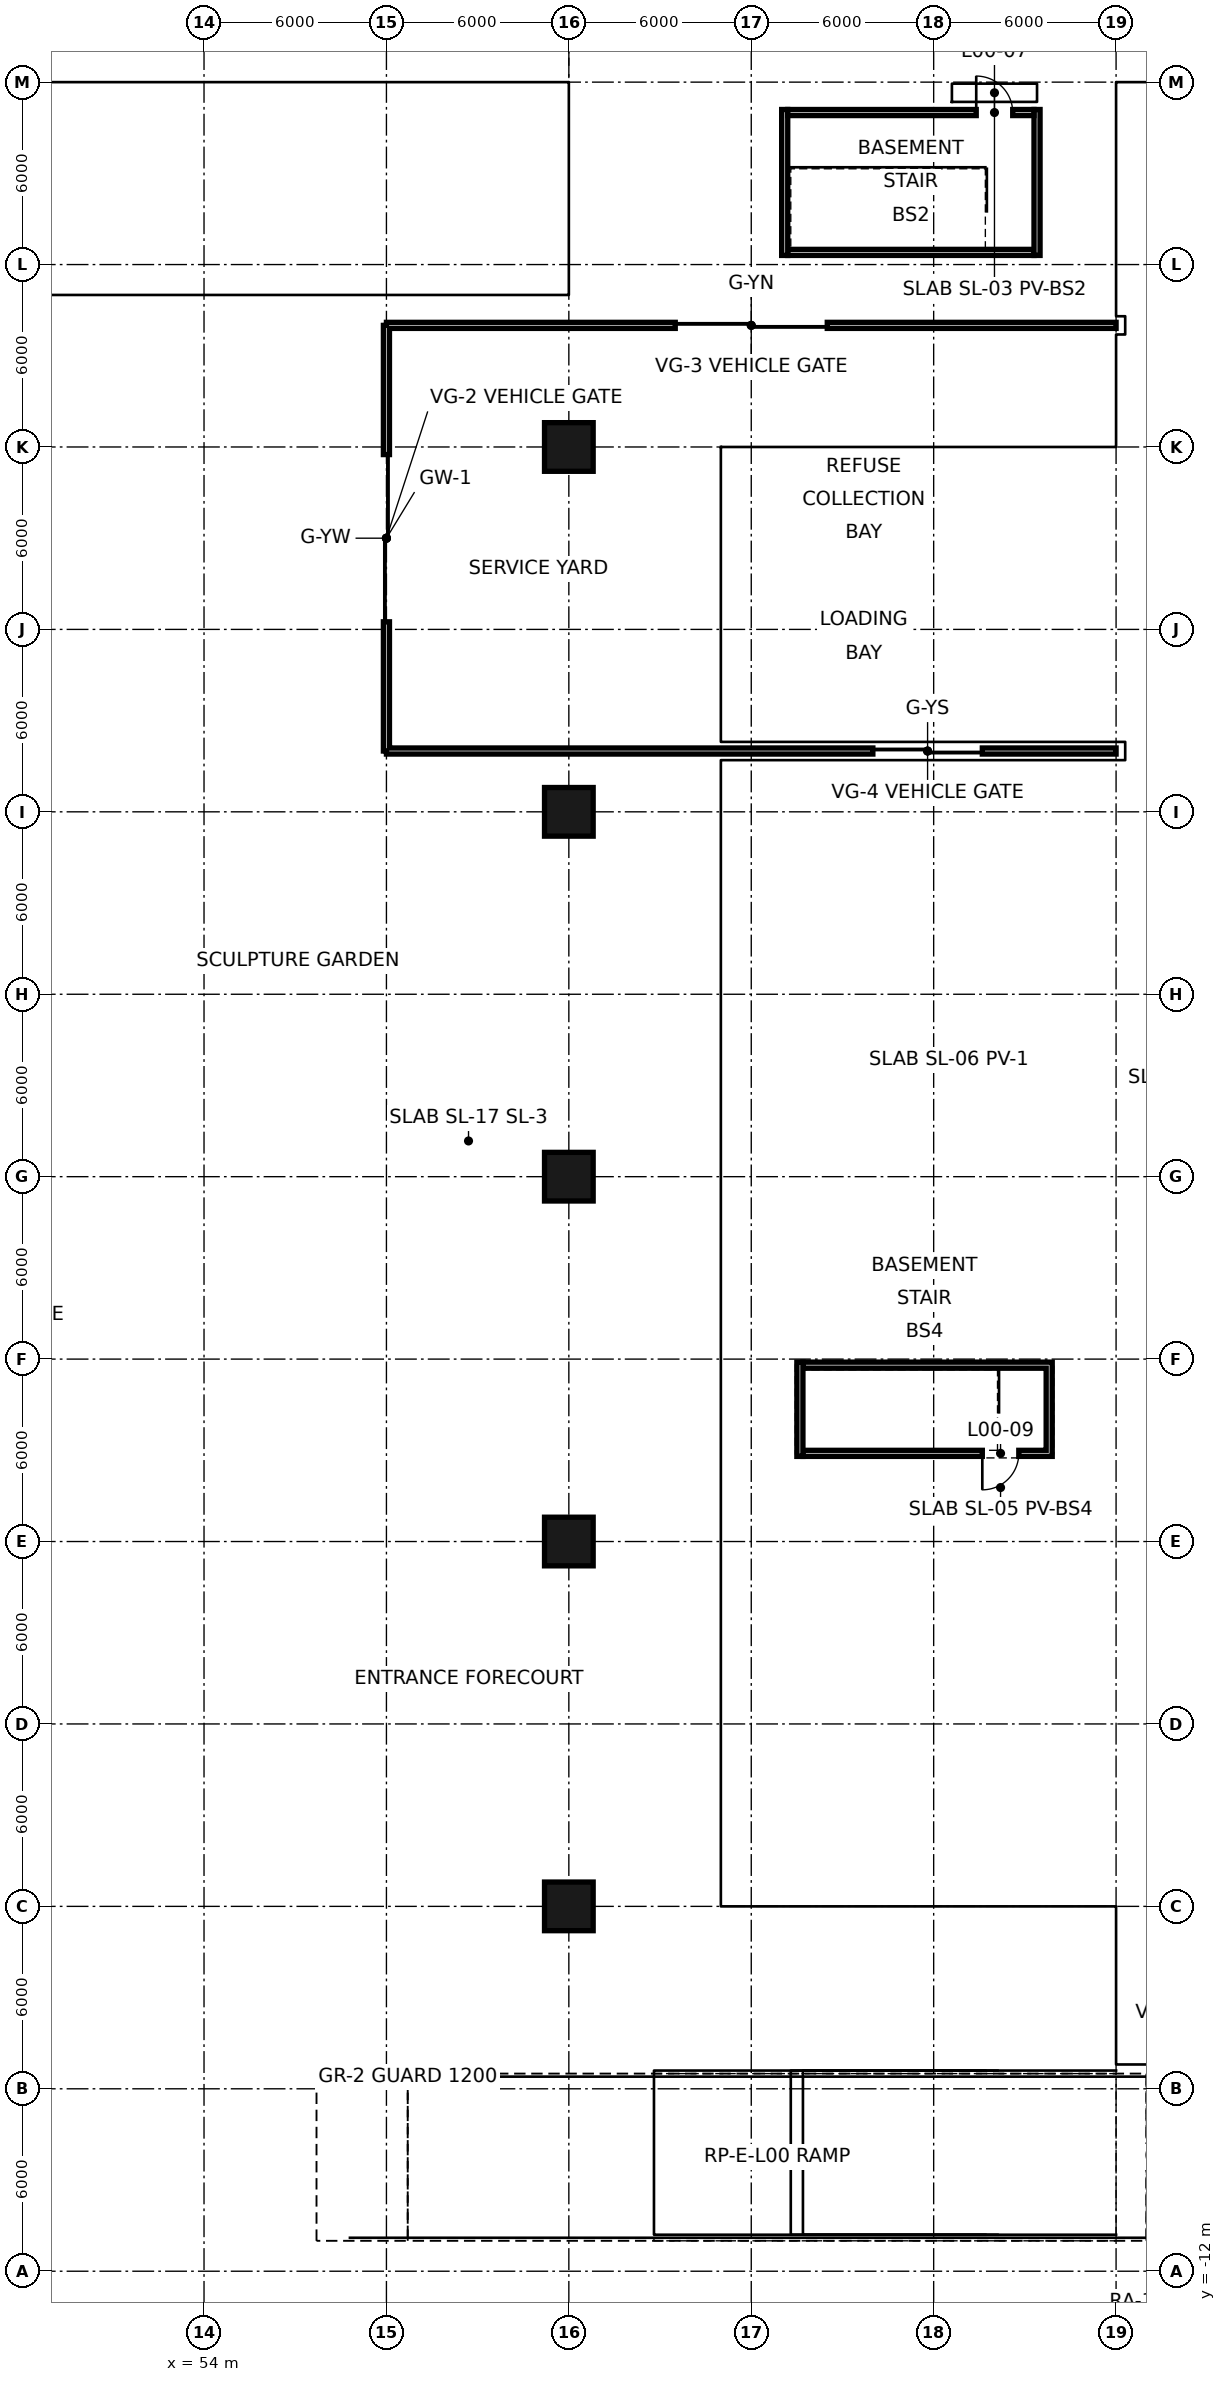
"""IFC4 building model, lengths in metres.
Left out: names, types, materials, properties, quantities, classifications, styles, units other than length and angle.
Written with IfcOpenShell. Run it as: python <this file> out.ifc"""

import sys

from ifc_helpers import new_model, si_unit, direction, frame, frame_2d, origin, origin_2d, place, context, subcontext, project, spatial, rectangle, hollow_rectangle, extrude, element, fill, save


model = new_model("IFC4")
c1 = context("Model", 3, precision=1e-05, world=origin(), true_north=direction((0.0, 1.0)))
c2 = subcontext(c1, "Body", "Model", "MODEL_VIEW")
j1 = project(units=[si_unit("LENGTHUNIT", "METRE"), si_unit("PLANEANGLEUNIT", "RADIAN")], contexts=[c1])
p1 = place(None, origin())
s1 = spatial("IfcSite", under=j1, at=p1, CompositionType="ELEMENT")
p2 = place(p1, origin())
s2 = spatial("IfcBuilding", under=s1, at=p2, CompositionType="ELEMENT")
p3 = place(p2, origin())
s3 = spatial("IfcBuildingStorey", under=s2, at=p3, CompositionType="ELEMENT", Elevation=0.0)
for number, where, z_axis, x_axis in (
    (1, (66.0, 0.0, 0.0), (0.0, 0.0, 1.0), (1.0, 0.0, 0.0)),
    (2, (66.0, 12.0, 0.0), (0.0, 0.0, 1.0), (1.0, 0.0, 0.0)),
    (3, (66.0, 24.0, 0.0), (0.0, 0.0, 1.0), (1.0, 0.0, 0.0)),
    (4, (66.0, 36.0, 0.0), (0.0, 0.0, 1.0), (1.0, 0.0, 0.0)),
    (5, (66.0, 48.0, 0.0), (0.0, 0.0, 1.0), (1.0, 0.0, 0.0)),
):
    element("IfcColumn", number, at=place(p3, frame(where, z_axis=z_axis, x_axis=x_axis)), inside=s3, PredefinedType="COLUMN", context=c2, shape_type="SweptSolid", body=[
        extrude(hollow_rectangle(XDim=1.6, YDim=1.6, WallThickness=0.07, at=origin_2d()), origin(), (0.0, 0.0, 1.0), 15.0),
    ])
p4 = place(p3, frame((73.1, 54.3, 0.0), z_axis=(0.0, 0.0, 1.0), x_axis=(0.0, 1.0, 0.0)))
e6 = element("IfcWall", 6, at=p4, inside=s3, PredefinedType="SOLIDWALL", context=c2, shape_type="SweptSolid", body=[
    extrude(rectangle(XDim=4.8, YDim=0.2, at=frame_2d((2.4, 0.0))), origin(), (0.0, 0.0, 1.0), 14.55),
])
p5 = place(p3, frame((73.6, 14.8, 0.0), z_axis=(0.0, 0.0, 1.0), x_axis=(0.0, 1.0, 0.0)))
e7 = element("IfcWall", 7, at=p5, inside=s3, PredefinedType="SOLIDWALL", context=c2, shape_type="SweptSolid", body=[
    extrude(rectangle(XDim=3.1, YDim=0.2, at=frame_2d((1.55, 0.0))), origin(), (0.0, 0.0, 1.0), 14.55),
])
p6 = place(p3, frame((81.4, 54.3, 0.0), z_axis=(0.0, 0.0, 1.0), x_axis=(0.0, 1.0, 0.0)))
e8 = element("IfcWall", 8, at=p6, inside=s3, PredefinedType="SOLIDWALL", context=c2, shape_type="SweptSolid", body=[
    extrude(rectangle(XDim=4.8, YDim=0.2, at=frame_2d((2.4, 0.0))), origin(), (0.0, 0.0, 1.0), 14.55),
])
p7 = place(p3, frame((81.8, 14.8, 0.0), z_axis=(0.0, 0.0, 1.0), x_axis=(0.0, 1.0, 0.0)))
e9 = element("IfcWall", 9, at=p7, inside=s3, PredefinedType="SOLIDWALL", context=c2, shape_type="SweptSolid", body=[
    extrude(rectangle(XDim=3.1, YDim=0.2, at=frame_2d((1.55, 0.0))), origin(), (0.0, 0.0, 1.0), 14.55),
])
p8 = place(p3, frame((73.7, 14.9, 0.0), z_axis=(0.0, 0.0, 1.0), x_axis=(1.0, 0.0, 0.0)))
e10 = element("IfcWall", 10, at=p8, inside=s3, PredefinedType="SOLIDWALL", context=c2, shape_type="SweptSolid", body=[
    extrude(rectangle(XDim=8.0, YDim=0.2, at=frame_2d((4.0, 0.0))), origin(), (0.0, 0.0, 1.0), 14.55),
])
p9 = place(p8, frame((5.9, 0.0, 0.0)))
e11 = element("IfcOpeningElement", 11, at=p9, cuts=e10, PredefinedType="OPENING", context=c2, shape_type="SweptSolid", body=[
    extrude(rectangle(XDim=1.2, YDim=2.4, at=frame_2d((0.6, 1.2))), frame((0.0, 0.11, 0.0), z_axis=(0.0, -1.0, 0.0), x_axis=(1.0, 0.0, 0.0)), (0.0, 0.0, 1.0), 0.22),
])
p10 = place(p3, frame((73.7, 17.8, 0.0), z_axis=(0.0, 0.0, 1.0), x_axis=(1.0, 0.0, 0.0)))
e12 = element("IfcWall", 12, at=p10, inside=s3, PredefinedType="SOLIDWALL", context=c2, shape_type="SweptSolid", body=[
    extrude(rectangle(XDim=8.0, YDim=0.2, at=frame_2d((4.0, 0.0))), origin(), (0.0, 0.0, 1.0), 14.55),
])
p11 = place(p3, frame((73.2, 54.4, 0.0), z_axis=(0.0, 0.0, 1.0), x_axis=(1.0, 0.0, 0.0)))
e13 = element("IfcWall", 13, at=p11, inside=s3, PredefinedType="SOLIDWALL", context=c2, shape_type="SweptSolid", body=[
    extrude(rectangle(XDim=8.1, YDim=0.2, at=frame_2d((4.05, 0.0))), origin(), (0.0, 0.0, 1.0), 14.55),
])
p12 = place(p3, frame((73.2, 59.0, 0.0), z_axis=(0.0, 0.0, 1.0), x_axis=(1.0, 0.0, 0.0)))
e14 = element("IfcWall", 14, at=p12, inside=s3, PredefinedType="SOLIDWALL", context=c2, shape_type="SweptSolid", body=[
    extrude(rectangle(XDim=8.1, YDim=0.2, at=frame_2d((4.05, 0.0))), origin(), (0.0, 0.0, 1.0), 14.55),
])
p13 = place(p12, frame((6.2, 0.0, 0.0)))
e15 = element("IfcOpeningElement", 15, at=p13, cuts=e14, PredefinedType="OPENING", context=c2, shape_type="SweptSolid", body=[
    extrude(rectangle(XDim=1.2, YDim=2.4, at=frame_2d((0.6, 1.2))), frame((0.0, 0.11, 0.0), z_axis=(0.0, -1.0, 0.0), x_axis=(1.0, 0.0, 0.0)), (0.0, 0.0, 1.0), 0.22),
])
p14 = place(p3, frame((60.0, 38.0, 0.0), z_axis=(0.0, 0.0, 1.0), x_axis=(0.0, 1.0, 0.0)))
e16 = element("IfcWall", 16, at=p14, inside=s3, PredefinedType="SOLIDWALL", context=c2, shape_type="SweptSolid", body=[
    extrude(rectangle(XDim=14.0, YDim=0.2, at=frame_2d((7.0, 0.0))), origin(), (0.0, 0.0, 1.0), 2.6),
])
p15 = place(p14, frame((4.25, 0.0, 0.0)))
e17 = element("IfcOpeningElement", 17, at=p15, cuts=e16, PredefinedType="OPENING", context=c2, shape_type="SweptSolid", body=[
    extrude(rectangle(XDim=5.5, YDim=2.3, at=frame_2d((2.75, 1.15))), frame((0.0, 0.11, 0.0), z_axis=(0.0, -1.0, 0.0), x_axis=(1.0, 0.0, 0.0)), (0.0, 0.0, 1.0), 0.22),
])
p16 = place(p3, frame((60.0, 52.0, 0.0), z_axis=(0.0, 0.0, 1.0), x_axis=(1.0, 0.0, 0.0)))
e18 = element("IfcWall", 18, at=p16, inside=s3, PredefinedType="SOLIDWALL", context=c2, shape_type="SweptSolid", body=[
    extrude(rectangle(XDim=24.0, YDim=0.2, at=frame_2d((12.0, 0.0))), origin(), (0.0, 0.0, 1.0), 2.6),
])
p17 = place(p16, frame((9.5, 0.0, 0.0)))
e19 = element("IfcOpeningElement", 19, at=p17, cuts=e18, PredefinedType="OPENING", context=c2, shape_type="SweptSolid", body=[
    extrude(rectangle(XDim=5.0, YDim=2.3, at=frame_2d((2.5, 1.15))), frame((0.0, 0.11, 0.0), z_axis=(0.0, -1.0, 0.0), x_axis=(1.0, 0.0, 0.0)), (0.0, 0.0, 1.0), 0.22),
])
p18 = place(p3, frame((60.0, 38.0, 0.0), z_axis=(0.0, 0.0, 1.0), x_axis=(1.0, 0.0, 0.0)))
e20 = element("IfcWall", 20, at=p18, inside=s3, PredefinedType="SOLIDWALL", context=c2, shape_type="SweptSolid", body=[
    extrude(rectangle(XDim=24.0, YDim=0.2, at=frame_2d((12.0, 0.0))), origin(), (0.0, 0.0, 1.0), 2.6),
])
p19 = place(p18, frame((16.0, 0.0, 0.0)))
e21 = element("IfcOpeningElement", 21, at=p19, cuts=e20, PredefinedType="OPENING", context=c2, shape_type="SweptSolid", body=[
    extrude(rectangle(XDim=3.6, YDim=2.3, at=frame_2d((1.8, 1.15))), frame((0.0, 0.11, 0.0), z_axis=(0.0, -1.0, 0.0), x_axis=(1.0, 0.0, 0.0)), (0.0, 0.0, 1.0), 0.22),
])
p20 = place(p13, origin())
e22 = element("IfcDoor", 22, at=p20, inside=s3, OperationType="SINGLE_SWING_LEFT", PredefinedType="DOOR", context=c2, shape_type="SweptSolid", body=[
    extrude(rectangle(XDim=1.2, YDim=2.4, at=frame_2d((0.6, 1.2))), frame((0.0, 0.025, 0.0), z_axis=(0.0, -1.0, 0.0), x_axis=(1.0, 0.0, 0.0)), (0.0, 0.0, 1.0), 0.05),
])
fill(e15, e22)
p21 = place(p9, frame((1.2, 0.0, 0.0), z_axis=(0.0, 0.0, 1.0), x_axis=(-1.0, 0.0, 0.0)))
e23 = element("IfcDoor", 23, at=p21, inside=s3, OperationType="SINGLE_SWING_RIGHT", PredefinedType="DOOR", context=c2, shape_type="SweptSolid", body=[
    extrude(rectangle(XDim=1.2, YDim=2.4, at=frame_2d((0.6, 1.2))), frame((0.0, 0.025, 0.0), z_axis=(0.0, -1.0, 0.0), x_axis=(1.0, 0.0, 0.0)), (0.0, 0.0, 1.0), 0.05),
])
fill(e11, e23)
p22 = place(p15, origin())
e24 = element("IfcDoor", 24, at=p22, inside=s3, OperationType="SLIDING_TO_LEFT", PredefinedType="GATE", context=c2, shape_type="SweptSolid", body=[
    extrude(rectangle(XDim=5.5, YDim=2.3, at=frame_2d((2.75, 1.15))), frame((0.0, 0.025, 0.0), z_axis=(0.0, -1.0, 0.0), x_axis=(1.0, 0.0, 0.0)), (0.0, 0.0, 1.0), 0.05),
])
fill(e17, e24)
p23 = place(p17, origin())
e25 = element("IfcDoor", 25, at=p23, inside=s3, OperationType="SLIDING_TO_LEFT", PredefinedType="GATE", context=c2, shape_type="SweptSolid", body=[
    extrude(rectangle(XDim=5.0, YDim=2.3, at=frame_2d((2.5, 1.15))), frame((0.0, 0.025, 0.0), z_axis=(0.0, -1.0, 0.0), x_axis=(1.0, 0.0, 0.0)), (0.0, 0.0, 1.0), 0.05),
])
fill(e19, e25)
p24 = place(p19, origin())
e26 = element("IfcDoor", 26, at=p24, inside=s3, OperationType="SLIDING_TO_LEFT", PredefinedType="GATE", context=c2, shape_type="SweptSolid", body=[
    extrude(rectangle(XDim=3.6, YDim=2.3, at=frame_2d((1.8, 1.15))), frame((0.0, 0.025, 0.0), z_axis=(0.0, -1.0, 0.0), x_axis=(1.0, 0.0, 0.0)), (0.0, 0.0, 1.0), 0.05),
])
fill(e21, e26)
save(model, sys.argv[1])
